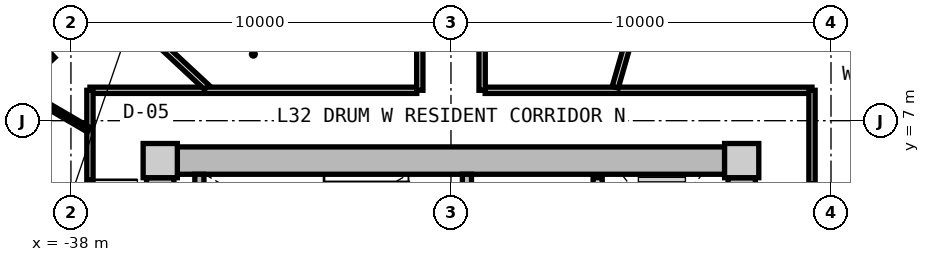
"""IFC4 building model, lengths in metres.
Left out: names, types, materials, properties, quantities, classifications, styles, units other than length and angle.
Written with IfcOpenShell. Run it as: python <this file> out.ifc"""

import sys

from ifc_helpers import new_model, si_unit, direction, frame, frame_2d, origin, origin_2d, place, context, subcontext, project, spatial, rectangle, extrude, source, transform, mapped, element, fill, save


model = new_model("IFC4")
c1 = context("Model", 3, precision=1e-05, world=origin(), true_north=direction((0.0, 1.0)))
c2 = subcontext(c1, "Body", "Model", "MODEL_VIEW")
j1 = project(units=[si_unit("LENGTHUNIT", "METRE"), si_unit("PLANEANGLEUNIT", "RADIAN")], contexts=[c1])
p1 = place(None, origin())
s1 = spatial("IfcSite", under=j1, at=p1, CompositionType="ELEMENT")
p2 = place(p1, origin())
s2 = spatial("IfcBuilding", under=s1, at=p2, CompositionType="ELEMENT")
p3 = place(p2, frame((0.0, 0.0, 105.4)))
s3 = spatial("IfcBuildingStorey", under=s2, at=p3, CompositionType="ELEMENT", Elevation=105.4)
m1 = source(origin(), c2, "Body", "SweptSolid", [
    extrude(rectangle(XDim=0.9, YDim=0.9, at=origin_2d()), origin(), (0.0, 0.0, 1.0), 3.05),
])
for number, where, z_axis, x_axis in (
    (1, (-20.35, 5.95, 0.0), (0.0, 0.0, 1.0), (1.0, 0.0, 0.0)),
    (2, (-35.65, 5.95, 0.0), (0.0, 0.0, 1.0), (1.0, 0.0, 0.0)),
):
    element("IfcColumn", number, at=place(p3, frame(where, z_axis=z_axis, x_axis=x_axis)), inside=s3, PredefinedType="COLUMN", context=c2, shape_type="MappedRepresentation", body=[
        mapped(m1, transform((0.0, 0.0, 0.0), x_axis=(1.0, 0.0, 0.0), y_axis=(0.0, 1.0, 0.0), z_axis=(0.0, 0.0, 1.0), scale=1.0)),
    ])
m2 = source(origin(), c2, "Body", "SweptSolid", [
    extrude(rectangle(XDim=14.4, YDim=0.72, at=frame_2d((7.2, 0.0))), origin(), (0.0, 0.0, 1.0), 2.79),
])
p4 = place(p3, frame((-35.2, 5.95, 0.0), z_axis=(0.0, 0.0, 1.0), x_axis=(1.0, 0.0, 0.0)))
e3 = element("IfcWall", 3, at=p4, inside=s3, PredefinedType="SHEAR", context=c2, shape_type="MappedRepresentation", body=[
    mapped(m2, transform((0.0, 0.0, 0.0), x_axis=(1.0, 0.0, 0.0), y_axis=(0.0, 1.0, 0.0), z_axis=(0.0, 0.0, 1.0), scale=1.0)),
])
m3 = source(origin(), c2, "Body", "SweptSolid", [
    extrude(rectangle(XDim=11.0, YDim=0.72, at=frame_2d((5.5, 0.0))), origin(), (0.0, 0.0, 1.0), 2.79),
])
p5 = place(p3, frame((-35.65, -5.5, 0.0), z_axis=(0.0, 0.0, 1.0), x_axis=(0.0, 1.0, 0.0)))
e4 = element("IfcWall", 4, at=p5, inside=s3, PredefinedType="SHEAR", context=c2, shape_type="MappedRepresentation", body=[
    mapped(m3, transform((0.0, 0.0, 0.0), x_axis=(1.0, 0.0, 0.0), y_axis=(0.0, 1.0, 0.0), z_axis=(0.0, 0.0, 1.0), scale=1.0)),
])
p6 = place(p5, frame((3.8, 0.0, 0.0)))
e5 = element("IfcOpeningElement", 5, at=p6, cuts=e4, PredefinedType="OPENING", context=c2, shape_type="SweptSolid", body=[
    extrude(rectangle(XDim=1.2, YDim=2.15, at=frame_2d((0.6, 1.075))), frame((0.0, 0.37, 0.0), z_axis=(0.0, -1.0, 0.0), x_axis=(1.0, 0.0, 0.0)), (0.0, 0.0, 1.0), 0.74),
])
p7 = place(p3, frame((-20.35, 5.5, 0.0), z_axis=(0.0, 0.0, 1.0), x_axis=(0.0, -1.0, 0.0)))
e6 = element("IfcWall", 6, at=p7, inside=s3, PredefinedType="SHEAR", context=c2, shape_type="MappedRepresentation", body=[
    mapped(m3, transform((0.0, 0.0, 0.0), x_axis=(1.0, 0.0, 0.0), y_axis=(0.0, 1.0, 0.0), z_axis=(0.0, 0.0, 1.0), scale=1.0)),
])
p8 = place(p7, frame((5.65, 0.0, 0.0)))
e7 = element("IfcOpeningElement", 7, at=p8, cuts=e6, PredefinedType="OPENING", context=c2, shape_type="SweptSolid", body=[
    extrude(rectangle(XDim=1.2, YDim=2.15, at=frame_2d((0.6, 1.075))), frame((0.0, 0.37, 0.0), z_axis=(0.0, -1.0, 0.0), x_axis=(1.0, 0.0, 0.0)), (0.0, 0.0, 1.0), 0.74),
])
m4 = source(origin(), c2, "Body", "SweptSolid", [
    extrude(rectangle(XDim=3.14, YDim=0.24, at=frame_2d((1.57, 0.0))), origin(), (0.0, 0.0, 1.0), 2.79),
])
p9 = place(p3, frame((-34.62, 2.45, 0.0), z_axis=(0.0, 0.0, 1.0), x_axis=(0.0, 1.0, 0.0)))
e8 = element("IfcWall", 8, at=p9, inside=s3, PredefinedType="PARTITIONING", context=c2, shape_type="MappedRepresentation", body=[
    mapped(m4, transform((0.0, 0.0, 0.0), x_axis=(1.0, 0.0, 0.0), y_axis=(0.0, 1.0, 0.0), z_axis=(0.0, 0.0, 1.0), scale=1.0)),
])
p10 = place(p3, frame((-27.58, 2.45, 0.0), z_axis=(0.0, 0.0, 1.0), x_axis=(0.0, 1.0, 0.0)))
e9 = element("IfcWall", 9, at=p10, inside=s3, PredefinedType="PARTITIONING", context=c2, shape_type="MappedRepresentation", body=[
    mapped(m4, transform((0.0, 0.0, 0.0), x_axis=(1.0, 0.0, 0.0), y_axis=(0.0, 1.0, 0.0), z_axis=(0.0, 0.0, 1.0), scale=1.0)),
])
p11 = place(p10, frame((0.55, 0.0, 0.0)))
e10 = element("IfcOpeningElement", 10, at=p11, cuts=e9, PredefinedType="OPENING", context=c2, shape_type="SweptSolid", body=[
    extrude(rectangle(XDim=1.1, YDim=2.15, at=frame_2d((0.55, 1.075))), frame((0.0, 0.13, 0.0), z_axis=(0.0, -1.0, 0.0), x_axis=(1.0, 0.0, 0.0)), (0.0, 0.0, 1.0), 0.26),
])
m5 = source(origin(), c2, "Body", "SweptSolid", [
    extrude(rectangle(XDim=5.0, YDim=0.24, at=frame_2d((2.5, 0.0))), origin(), (0.0, 0.0, 1.0), 2.775),
])
p12 = place(p3, frame((-24.14, 0.5, 0.0), z_axis=(0.0, 0.0, 1.0), x_axis=(0.0, 1.0, 0.0)))
e11 = element("IfcWall", 11, at=p12, inside=s3, PredefinedType="PARTITIONING", context=c2, shape_type="MappedRepresentation", body=[
    mapped(m5, transform((0.0, 0.0, 0.0), x_axis=(1.0, 0.0, 0.0), y_axis=(0.0, 1.0, 0.0), z_axis=(0.0, 0.0, 1.0), scale=1.0)),
])
p13 = place(p12, frame((3.05, 0.0, 0.0)))
e12 = element("IfcOpeningElement", 12, at=p13, cuts=e11, PredefinedType="OPENING", context=c2, shape_type="SweptSolid", body=[
    extrude(rectangle(XDim=1.3, YDim=2.2, at=frame_2d((0.65, 1.1))), frame((0.0, 0.13, 0.0), z_axis=(0.0, -1.0, 0.0), x_axis=(1.0, 0.0, 0.0)), (0.0, 0.0, 1.0), 0.26),
])
p14 = place(p12, frame((0.55, 0.0, 0.0)))
e13 = element("IfcOpeningElement", 13, at=p14, cuts=e11, PredefinedType="OPENING", context=c2, shape_type="SweptSolid", body=[
    extrude(rectangle(XDim=1.3, YDim=2.2, at=frame_2d((0.65, 1.1))), frame((0.0, 0.13, 0.0), z_axis=(0.0, -1.0, 0.0), x_axis=(1.0, 0.0, 0.0)), (0.0, 0.0, 1.0), 0.26),
])
m6 = source(origin(), c2, "Body", "SweptSolid", [
    extrude(rectangle(XDim=8.6, YDim=0.165, at=frame_2d((4.3, 0.0))), origin(), (0.0, 0.0, 1.0), 2.775),
])
for number, where, z_axis, x_axis in (
    (14, (-37.5, 7.8, 0.0), (0.0, 0.0, 1.0), (1.0, 0.0, 0.0)),
    (15, (-27.1, 7.8, 0.0), (0.0, 0.0, 1.0), (1.0, 0.0, 0.0)),
):
    element("IfcWall", number, at=place(p3, frame(where, z_axis=z_axis, x_axis=x_axis)), inside=s3, PredefinedType="PARTITIONING", context=c2, shape_type="MappedRepresentation", body=[
        mapped(m6, transform((0.0, 0.0, 0.0), x_axis=(1.0, 0.0, 0.0), y_axis=(0.0, 1.0, 0.0), z_axis=(0.0, 0.0, 1.0), scale=1.0)),
    ])
m7 = source(origin(), c2, "Body", "SweptSolid", [
    extrude(rectangle(XDim=15.6, YDim=0.165, at=frame_2d((7.8, 0.0))), origin(), (0.0, 0.0, 1.0), 2.775),
])
p15 = place(p3, frame((-37.5, -7.8, 0.0), z_axis=(0.0, 0.0, 1.0), x_axis=(0.0, 1.0, 0.0)))
e16 = element("IfcWall", 16, at=p15, inside=s3, PredefinedType="PARTITIONING", context=c2, shape_type="MappedRepresentation", body=[
    mapped(m7, transform((0.0, 0.0, 0.0), x_axis=(1.0, 0.0, 0.0), y_axis=(0.0, 1.0, 0.0), z_axis=(0.0, 0.0, 1.0), scale=1.0)),
])
p16 = place(p15, frame((11.994, 0.0, 0.0)))
e17 = element("IfcOpeningElement", 17, at=p16, cuts=e16, PredefinedType="OPENING", context=c2, shape_type="SweptSolid", body=[
    extrude(rectangle(XDim=1.25, YDim=2.2, at=frame_2d((0.625, 1.1))), frame((0.0, 0.093, 0.0), z_axis=(0.0, -1.0, 0.0), x_axis=(1.0, 0.0, 0.0)), (0.0, 0.0, 1.0), 0.185),
])
p17 = place(p15, frame((7.984, 0.0, 0.0)))
e18 = element("IfcOpeningElement", 18, at=p17, cuts=e16, PredefinedType="OPENING", context=c2, shape_type="SweptSolid", body=[
    extrude(rectangle(XDim=1.05, YDim=2.15, at=frame_2d((0.525, 1.075))), frame((0.0, 0.093, 0.0), z_axis=(0.0, -1.0, 0.0), x_axis=(1.0, 0.0, 0.0)), (0.0, 0.0, 1.0), 0.185),
])
p18 = place(p15, frame((5.777, 0.0, 0.0)))
e19 = element("IfcOpeningElement", 19, at=p18, cuts=e16, PredefinedType="OPENING", context=c2, shape_type="SweptSolid", body=[
    extrude(rectangle(XDim=1.05, YDim=2.15, at=frame_2d((0.525, 1.075))), frame((0.0, 0.093, 0.0), z_axis=(0.0, -1.0, 0.0), x_axis=(1.0, 0.0, 0.0)), (0.0, 0.0, 1.0), 0.185),
])
p19 = place(p3, frame((-18.5, 7.8, 0.0), z_axis=(0.0, 0.0, 1.0), x_axis=(0.0, -1.0, 0.0)))
e20 = element("IfcWall", 20, at=p19, inside=s3, PredefinedType="PARTITIONING", context=c2, shape_type="MappedRepresentation", body=[
    mapped(m7, transform((0.0, 0.0, 0.0), x_axis=(1.0, 0.0, 0.0), y_axis=(0.0, 1.0, 0.0), z_axis=(0.0, 0.0, 1.0), scale=1.0)),
])
p20 = place(p19, frame((12.002, 0.0, 0.0)))
e21 = element("IfcOpeningElement", 21, at=p20, cuts=e20, PredefinedType="OPENING", context=c2, shape_type="SweptSolid", body=[
    extrude(rectangle(XDim=1.05, YDim=2.15, at=frame_2d((0.525, 1.075))), frame((0.0, 0.093, 0.0), z_axis=(0.0, -1.0, 0.0), x_axis=(1.0, 0.0, 0.0)), (0.0, 0.0, 1.0), 0.185),
])
p21 = place(p19, frame((10.211, 0.0, 0.0)))
e22 = element("IfcOpeningElement", 22, at=p21, cuts=e20, PredefinedType="OPENING", context=c2, shape_type="SweptSolid", body=[
    extrude(rectangle(XDim=1.05, YDim=2.15, at=frame_2d((0.525, 1.075))), frame((0.0, 0.093, 0.0), z_axis=(0.0, -1.0, 0.0), x_axis=(1.0, 0.0, 0.0)), (0.0, 0.0, 1.0), 0.185),
])
p22 = place(p19, frame((7.722, 0.0, 0.0)))
e23 = element("IfcOpeningElement", 23, at=p22, cuts=e20, PredefinedType="OPENING", context=c2, shape_type="SweptSolid", body=[
    extrude(rectangle(XDim=1.05, YDim=2.15, at=frame_2d((0.525, 1.075))), frame((0.0, 0.093, 0.0), z_axis=(0.0, -1.0, 0.0), x_axis=(1.0, 0.0, 0.0)), (0.0, 0.0, 1.0), 0.185),
])
p23 = place(p19, frame((6.291, 0.0, 0.0)))
e24 = element("IfcOpeningElement", 24, at=p23, cuts=e20, PredefinedType="OPENING", context=c2, shape_type="SweptSolid", body=[
    extrude(rectangle(XDim=1.05, YDim=2.15, at=frame_2d((0.525, 1.075))), frame((0.0, 0.093, 0.0), z_axis=(0.0, -1.0, 0.0), x_axis=(1.0, 0.0, 0.0)), (0.0, 0.0, 1.0), 0.185),
])
p24 = place(p19, frame((2.465, 0.0, 0.0)))
e25 = element("IfcOpeningElement", 25, at=p24, cuts=e20, PredefinedType="OPENING", context=c2, shape_type="SweptSolid", body=[
    extrude(rectangle(XDim=1.25, YDim=2.2, at=frame_2d((0.625, 1.1))), frame((0.0, 0.093, 0.0), z_axis=(0.0, -1.0, 0.0), x_axis=(1.0, 0.0, 0.0)), (0.0, 0.0, 1.0), 0.185),
])
m8 = source(origin(), c2, "Body", "SweptSolid", [
    extrude(rectangle(XDim=8.989, YDim=0.165, at=frame_2d((4.495, 0.0))), origin(), (0.0, 0.0, 1.0), 2.275),
])
p25 = place(p3, frame((-23.678, 7.88, 0.0), z_axis=(0.0, 0.0, 1.0), x_axis=(0.27702323008, 0.960863221274, 0.0)))
e26 = element("IfcWall", 26, at=p25, inside=s3, PredefinedType="PARTITIONING", context=c2, shape_type="MappedRepresentation", body=[
    mapped(m8, transform((0.0, 0.0, 0.0), x_axis=(1.0, 0.0, 0.0), y_axis=(0.0, 1.0, 0.0), z_axis=(0.0, 0.0, 1.0), scale=1.0)),
])
m9 = source(origin(), c2, "Body", "SweptSolid", [
    extrude(rectangle(XDim=6.187, YDim=0.165, at=frame_2d((3.093, 0.0))), origin(), (0.0, 0.0, 1.0), 2.275),
])
p26 = place(p3, frame((-34.429, 7.88, 0.0), z_axis=(0.0, 0.0, 1.0), x_axis=(-0.732501077882, 0.680765870841, 0.0)))
e27 = element("IfcWall", 27, at=p26, inside=s3, PredefinedType="PARTITIONING", context=c2, shape_type="MappedRepresentation", body=[
    mapped(m9, transform((0.0, 0.0, 0.0), x_axis=(1.0, 0.0, 0.0), y_axis=(0.0, 1.0, 0.0), z_axis=(0.0, 0.0, 1.0), scale=1.0)),
])
m10 = source(origin(), c2, "Body", "SweptSolid", [
    extrude(rectangle(XDim=7.56, YDim=0.165, at=frame_2d((3.78, 0.0))), origin(), (0.0, 0.0, 1.0), 2.775),
])
p27 = place(p3, frame((-28.82, 7.8, 0.0), z_axis=(0.0, 0.0, 1.0), x_axis=(0.0, 1.0, 0.0)))
e28 = element("IfcWall", 28, at=p27, inside=s3, PredefinedType="PARTITIONING", context=c2, shape_type="MappedRepresentation", body=[
    mapped(m10, transform((0.0, 0.0, 0.0), x_axis=(1.0, 0.0, 0.0), y_axis=(0.0, 1.0, 0.0), z_axis=(0.0, 0.0, 1.0), scale=1.0)),
])
p28 = place(p27, frame((3.255, 0.0, 0.0)))
e29 = element("IfcOpeningElement", 29, at=p28, cuts=e28, PredefinedType="OPENING", context=c2, shape_type="SweptSolid", body=[
    extrude(rectangle(XDim=1.05, YDim=2.15, at=frame_2d((0.525, 1.075))), frame((0.0, 0.093, 0.0), z_axis=(0.0, -1.0, 0.0), x_axis=(1.0, 0.0, 0.0)), (0.0, 0.0, 1.0), 0.185),
])
p29 = place(p3, frame((-27.18, 7.8, 0.0), z_axis=(0.0, 0.0, 1.0), x_axis=(0.0, 1.0, 0.0)))
e30 = element("IfcWall", 30, at=p29, inside=s3, PredefinedType="PARTITIONING", context=c2, shape_type="MappedRepresentation", body=[
    mapped(m10, transform((0.0, 0.0, 0.0), x_axis=(1.0, 0.0, 0.0), y_axis=(0.0, 1.0, 0.0), z_axis=(0.0, 0.0, 1.0), scale=1.0)),
])
p30 = place(p29, frame((3.255, 0.0, 0.0)))
e31 = element("IfcOpeningElement", 31, at=p30, cuts=e30, PredefinedType="OPENING", context=c2, shape_type="SweptSolid", body=[
    extrude(rectangle(XDim=1.05, YDim=2.15, at=frame_2d((0.525, 1.075))), frame((0.0, 0.093, 0.0), z_axis=(0.0, -1.0, 0.0), x_axis=(1.0, 0.0, 0.0)), (0.0, 0.0, 1.0), 0.185),
])
m11 = source(origin(), c2, "Body", "SweptSolid", [
    extrude(rectangle(XDim=2.172, YDim=0.14, at=frame_2d((1.086, 0.0))), origin(), (0.0, 0.0, 1.0), 2.775),
])
p31 = place(p3, frame((-37.53, 6.762, 0.0), z_axis=(0.0, 0.0, 1.0), x_axis=(-0.863562702562, 0.504241468688, 0.0)))
e32 = element("IfcWall", 32, at=p31, inside=s3, PredefinedType="PARTITIONING", context=c2, shape_type="MappedRepresentation", body=[
    mapped(m11, transform((0.0, 0.0, 0.0), x_axis=(1.0, 0.0, 0.0), y_axis=(0.0, 1.0, 0.0), z_axis=(0.0, 0.0, 1.0), scale=1.0)),
])
m12 = source(origin(), c2, "Body", "SweptSolid", [
    extrude(rectangle(XDim=3.457, YDim=0.14, at=frame_2d((1.729, 0.0))), origin(), (0.0, 0.0, 1.0), 2.775),
])
p32 = place(p3, frame((-39.405, 7.857, 0.0), z_axis=(0.0, 0.0, 1.0), x_axis=(0.737567375492, 0.675273549467, 0.0)))
e33 = element("IfcWall", 33, at=p32, inside=s3, PredefinedType="PARTITIONING", context=c2, shape_type="MappedRepresentation", body=[
    mapped(m12, transform((0.0, 0.0, 0.0), x_axis=(1.0, 0.0, 0.0), y_axis=(0.0, 1.0, 0.0), z_axis=(0.0, 0.0, 1.0), scale=1.0)),
])
p33 = place(p32, frame((1.268, 0.0, 0.0)))
e34 = element("IfcOpeningElement", 34, at=p33, cuts=e33, PredefinedType="OPENING", context=c2, shape_type="SweptSolid", body=[
    extrude(rectangle(XDim=0.92, YDim=2.1, at=frame_2d((0.46, 1.05))), frame((0.0, 0.08, 0.0), z_axis=(0.0, -1.0, 0.0), x_axis=(1.0, 0.0, 0.0)), (0.0, 0.0, 1.0), 0.16),
])
m13 = source(origin(), c2, "Body", "SweptSolid", [
    extrude(rectangle(XDim=1.25, YDim=2.2, at=frame_2d((0.625, 1.1))), frame((0.0, 0.025, 0.0), z_axis=(0.0, -1.0, 0.0), x_axis=(1.0, 0.0, 0.0)), (0.0, 0.0, 1.0), 0.05),
])
p34 = place(p16, frame((1.25, 0.0, 0.0), z_axis=(0.0, 0.0, 1.0), x_axis=(-1.0, 0.0, 0.0)))
e35 = element("IfcDoor", 35, at=p34, inside=s3, OperationType="SINGLE_SWING_LEFT", PredefinedType="DOOR", context=c2, shape_type="MappedRepresentation", body=[
    mapped(m13, transform((0.0, 0.0, 0.0), x_axis=(1.0, 0.0, 0.0), y_axis=(0.0, 1.0, 0.0), z_axis=(0.0, 0.0, 1.0), scale=1.0)),
])
fill(e17, e35)
m14 = source(origin(), c2, "Body", "SweptSolid", [
    extrude(rectangle(XDim=0.92, YDim=2.1, at=frame_2d((0.46, 1.05))), frame((0.0, 0.025, 0.0), z_axis=(0.0, -1.0, 0.0), x_axis=(1.0, 0.0, 0.0)), (0.0, 0.0, 1.0), 0.05),
])
p35 = place(p33, origin())
e36 = element("IfcDoor", 36, at=p35, inside=s3, OperationType="SINGLE_SWING_RIGHT", PredefinedType="DOOR", context=c2, shape_type="MappedRepresentation", body=[
    mapped(m14, transform((0.0, 0.0, 0.0), x_axis=(1.0, 0.0, 0.0), y_axis=(0.0, 1.0, 0.0), z_axis=(0.0, 0.0, 1.0), scale=1.0)),
])
fill(e34, e36)
save(model, sys.argv[1])
